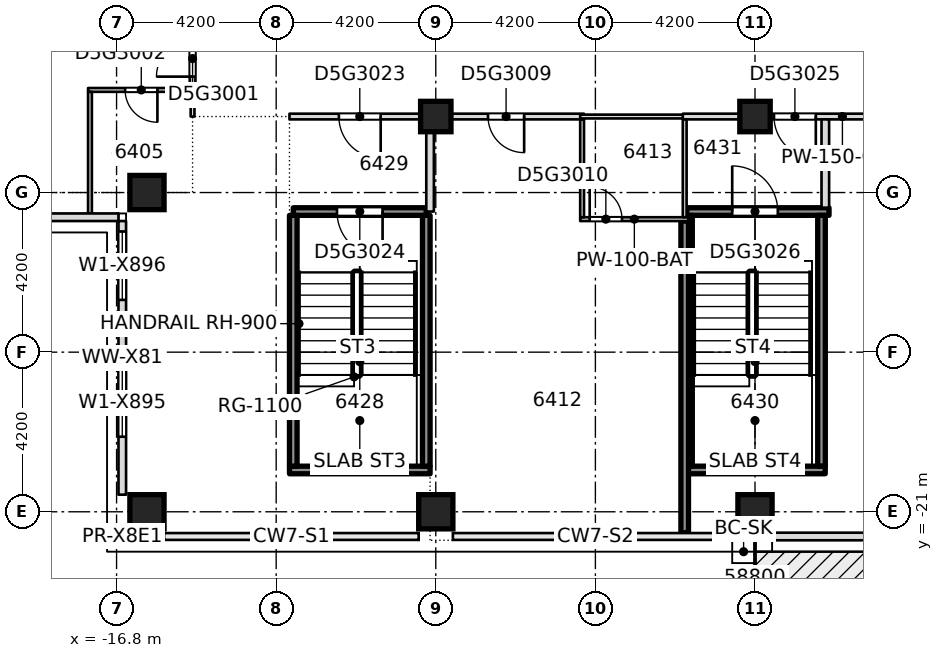
"""IFC4 building model, lengths in metres.
Left out: names, types, materials, properties, quantities, classifications, styles, units other than length and angle.
Written with IfcOpenShell. Run it as: python <this file> out.ifc"""

import sys

from ifc_helpers import new_model, si_unit, direction, frame, frame_2d, origin, origin_2d, place, context, subcontext, project, spatial, rectangle, extrude, element, fill, save


model = new_model("IFC4")
c1 = context("Model", 3, precision=1e-05, world=origin(), true_north=direction((0.0, 1.0)))
c2 = subcontext(c1, "Body", "Model", "MODEL_VIEW")
j1 = project(units=[si_unit("LENGTHUNIT", "METRE"), si_unit("PLANEANGLEUNIT", "RADIAN")], contexts=[c1])
p1 = place(None, origin())
s1 = spatial("IfcSite", under=j1, at=p1, CompositionType="ELEMENT")
p2 = place(p1, origin())
s2 = spatial("IfcBuilding", under=s1, at=p2, CompositionType="ELEMENT")
p3 = place(p2, frame((0.0, 0.0, 244.15)))
s3 = spatial("IfcBuildingStorey", under=s2, at=p3, CompositionType="ELEMENT", Elevation=244.15)
for number, where, z_axis, x_axis in (
    (1, (-16.0, -21.0, -0.4), (0.0, 0.0, 1.0), (1.0, 0.0, 0.0)),
    (2, (-8.4, -21.0, -0.4), (0.0, 0.0, 1.0), (1.0, 0.0, 0.0)),
    (3, (0.0, -21.0, -0.4), (0.0, 0.0, 1.0), (1.0, 0.0, 0.0)),
    (4, (-16.0, -12.6, -0.4), (0.0, 0.0, 1.0), (1.0, 0.0, 0.0)),
):
    element("IfcColumn", number, at=place(p3, frame(where, z_axis=z_axis, x_axis=x_axis)), inside=s3, PredefinedType="COLUMN", context=c2, shape_type="SweptSolid", body=[
        extrude(rectangle(XDim=0.9, YDim=0.9, at=origin_2d()), origin(), (0.0, 0.0, 1.0), 3.45),
    ])
for number, where, z_axis, x_axis in (
    (5, (-8.4, -10.6, -0.4), (0.0, 0.0, 1.0), (1.0, 0.0, 0.0)),
    (6, (0.0, -10.6, -0.4), (0.0, 0.0, 1.0), (1.0, 0.0, 0.0)),
):
    element("IfcColumn", number, at=place(p3, frame(where, z_axis=z_axis, x_axis=x_axis)), inside=s3, PredefinedType="COLUMN", context=c2, shape_type="SweptSolid", body=[
        extrude(rectangle(XDim=0.8, YDim=0.8, at=origin_2d()), origin(), (0.0, 0.0, 1.0), 3.45),
    ])
p4 = place(p3, frame((-1.848, -19.9, 0.0), z_axis=(0.0, 0.0, 1.0), x_axis=(1.0, 0.0, 0.0)))
e7 = element("IfcWall", 7, at=p4, inside=s3, PredefinedType="SOLIDWALL", context=c2, shape_type="SweptSolid", body=[
    extrude(rectangle(XDim=3.696, YDim=0.2, at=frame_2d((1.848, 0.0))), origin(), (0.0, 0.0, 1.0), 3.05),
])
p5 = place(p3, frame((-4.6, -13.3, 0.0), z_axis=(0.0, 0.0, 1.0), x_axis=(1.0, 0.0, 0.0)))
e8 = element("IfcWall", 8, at=p5, inside=s3, PredefinedType="PARTITIONING", context=c2, shape_type="SweptSolid", body=[
    extrude(rectangle(XDim=2.85, YDim=0.1, at=frame_2d((1.425, 0.0))), origin(), (0.0, 0.0, 1.0), 3.05),
])
p6 = place(p5, frame((0.25, 0.0, 0.0)))
e9 = element("IfcOpeningElement", 9, at=p6, cuts=e8, PredefinedType="OPENING", context=c2, shape_type="SweptSolid", body=[
    extrude(rectangle(XDim=0.85, YDim=2.1, at=frame_2d((0.425, 1.05))), frame((0.0, 0.06, 0.0), z_axis=(0.0, -1.0, 0.0), x_axis=(1.0, 0.0, 0.0)), (0.0, 0.0, 1.0), 0.12),
])
p7 = place(p3, frame((-12.15, -13.1, 0.0), z_axis=(0.0, 0.0, 1.0), x_axis=(1.0, 0.0, 0.0)))
e10 = element("IfcWall", 10, at=p7, inside=s3, PredefinedType="SOLIDWALL", context=c2, shape_type="SweptSolid", body=[
    extrude(rectangle(XDim=3.5, YDim=0.2, at=frame_2d((1.75, 0.0))), origin(), (0.0, 0.0, 1.0), 3.05),
])
p8 = place(p7, frame((1.15, 0.0, 0.0)))
e11 = element("IfcOpeningElement", 11, at=p8, cuts=e10, PredefinedType="OPENING", context=c2, shape_type="SweptSolid", body=[
    extrude(rectangle(XDim=1.2, YDim=2.1, at=frame_2d((0.6, 1.05))), frame((0.0, 0.11, 0.0), z_axis=(0.0, -1.0, 0.0), x_axis=(1.0, 0.0, 0.0)), (0.0, 0.0, 1.0), 0.22),
])
p9 = place(p3, frame((-1.798, -13.1, 0.0), z_axis=(0.0, 0.0, 1.0), x_axis=(1.0, 0.0, 0.0)))
e12 = element("IfcWall", 12, at=p9, inside=s3, PredefinedType="SOLIDWALL", context=c2, shape_type="SweptSolid", body=[
    extrude(rectangle(XDim=3.746, YDim=0.2, at=frame_2d((1.873, 0.0))), origin(), (0.0, 0.0, 1.0), 3.05),
])
p10 = place(p9, frame((1.198, 0.0, 0.0)))
e13 = element("IfcOpeningElement", 13, at=p10, cuts=e12, PredefinedType="OPENING", context=c2, shape_type="SweptSolid", body=[
    extrude(rectangle(XDim=1.2, YDim=2.1, at=frame_2d((0.6, 1.05))), frame((0.0, 0.11, 0.0), z_axis=(0.0, -1.0, 0.0), x_axis=(1.0, 0.0, 0.0)), (0.0, 0.0, 1.0), 0.22),
])
p11 = place(p3, frame((-12.25, -10.6, 0.0), z_axis=(0.0, 0.0, 1.0), x_axis=(1.0, 0.0, 0.0)))
e14 = element("IfcWall", 14, at=p11, inside=s3, PredefinedType="PARTITIONING", context=c2, shape_type="SweptSolid", body=[
    extrude(rectangle(XDim=7.75, YDim=0.15, at=frame_2d((3.875, 0.0))), origin(), (0.0, 0.0, 1.0), 3.05),
])
p12 = place(p11, frame((5.225, 0.0, 0.0)))
e15 = element("IfcOpeningElement", 15, at=p12, cuts=e14, PredefinedType="OPENING", context=c2, shape_type="SweptSolid", body=[
    extrude(rectangle(XDim=0.95, YDim=2.1, at=frame_2d((0.475, 1.05))), frame((0.0, 0.085, 0.0), z_axis=(0.0, -1.0, 0.0), x_axis=(1.0, 0.0, 0.0)), (0.0, 0.0, 1.0), 0.17),
])
p13 = place(p11, frame((1.3, 0.0, 0.0)))
e16 = element("IfcOpeningElement", 16, at=p13, cuts=e14, PredefinedType="OPENING", context=c2, shape_type="SweptSolid", body=[
    extrude(rectangle(XDim=1.1, YDim=2.1, at=frame_2d((0.55, 1.05))), frame((0.0, 0.085, 0.0), z_axis=(0.0, -1.0, 0.0), x_axis=(1.0, 0.0, 0.0)), (0.0, 0.0, 1.0), 0.17),
])
p14 = place(p3, frame((-4.6, -10.6, 0.0), z_axis=(0.0, 0.0, 1.0), x_axis=(1.0, 0.0, 0.0)))
e17 = element("IfcWall", 17, at=p14, inside=s3, PredefinedType="PARTITIONING", context=c2, shape_type="SweptSolid", body=[
    extrude(rectangle(XDim=2.8, YDim=0.1, at=frame_2d((1.4, 0.0))), origin(), (0.0, 0.0, 1.0), 3.05),
])
p15 = place(p3, frame((-1.9, -10.6, 0.0), z_axis=(0.0, 0.0, 1.0), x_axis=(1.0, 0.0, 0.0)))
e18 = element("IfcWall", 18, at=p15, inside=s3, PredefinedType="PARTITIONING", context=c2, shape_type="SweptSolid", body=[
    extrude(rectangle(XDim=8.4, YDim=0.15, at=frame_2d((4.2, 0.0))), origin(), (0.0, 0.0, 1.0), 3.05),
])
p16 = place(p15, frame((5.575, 0.0, 0.0)))
e19 = element("IfcOpeningElement", 19, at=p16, cuts=e18, PredefinedType="OPENING", context=c2, shape_type="SweptSolid", body=[
    extrude(rectangle(XDim=0.95, YDim=2.1, at=frame_2d((0.475, 1.05))), frame((0.0, 0.085, 0.0), z_axis=(0.0, -1.0, 0.0), x_axis=(1.0, 0.0, 0.0)), (0.0, 0.0, 1.0), 0.17),
])
p17 = place(p15, frame((2.4, 0.0, 0.0)))
e20 = element("IfcOpeningElement", 20, at=p17, cuts=e18, PredefinedType="OPENING", context=c2, shape_type="SweptSolid", body=[
    extrude(rectangle(XDim=1.1, YDim=2.1, at=frame_2d((0.55, 1.05))), frame((0.0, 0.085, 0.0), z_axis=(0.0, -1.0, 0.0), x_axis=(1.0, 0.0, 0.0)), (0.0, 0.0, 1.0), 0.17),
])
p18 = place(p3, frame((-17.55, -9.9, 0.0), z_axis=(0.0, 0.0, 1.0), x_axis=(1.0, 0.0, 0.0)))
e21 = element("IfcWall", 21, at=p18, inside=s3, PredefinedType="PARTITIONING", context=c2, shape_type="SweptSolid", body=[
    extrude(rectangle(XDim=2.825, YDim=0.1, at=frame_2d((1.413, 0.0))), origin(), (0.0, 0.0, 1.0), 3.05),
])
p19 = place(p18, frame((0.975, 0.0, 0.0)))
e22 = element("IfcOpeningElement", 22, at=p19, cuts=e21, PredefinedType="OPENING", context=c2, shape_type="SweptSolid", body=[
    extrude(rectangle(XDim=0.85, YDim=2.1, at=frame_2d((0.425, 1.05))), frame((0.0, 0.06, 0.0), z_axis=(0.0, -1.0, 0.0), x_axis=(1.0, 0.0, 0.0)), (0.0, 0.0, 1.0), 0.12),
])
p20 = place(p3, frame((-17.5, -13.15, 0.0), z_axis=(0.0, 0.0, 1.0), x_axis=(0.0, 1.0, 0.0)))
e23 = element("IfcWall", 23, at=p20, inside=s3, PredefinedType="PARTITIONING", context=c2, shape_type="SweptSolid", body=[
    extrude(rectangle(XDim=3.2, YDim=0.1, at=frame_2d((1.6, 0.0))), origin(), (0.0, 0.0, 1.0), 3.05),
])
p21 = place(p3, frame((-14.8, -10.6, 0.0), z_axis=(0.0, 0.0, 1.0), x_axis=(0.0, 1.0, 0.0)))
e24 = element("IfcWall", 24, at=p21, inside=s3, PredefinedType="PARTITIONING", context=c2, shape_type="SweptSolid", body=[
    extrude(rectangle(XDim=0.65, YDim=0.1, at=frame_2d((0.325, 0.0))), origin(), (0.0, 0.0, 1.0), 3.05),
])
p22 = place(p3, frame((-14.8, -9.85, 0.0), z_axis=(0.0, 0.0, 1.0), x_axis=(0.0, 1.0, 0.0)))
e25 = element("IfcWall", 25, at=p22, inside=s3, PredefinedType="PARTITIONING", context=c2, shape_type="SweptSolid", body=[
    extrude(rectangle(XDim=31.4, YDim=0.15, at=frame_2d((15.7, 0.0))), origin(), (0.0, 0.0, 1.0), 3.05),
])
p23 = place(p22, frame((0.3, 0.0, 0.0)))
e26 = element("IfcOpeningElement", 26, at=p23, cuts=e25, PredefinedType="OPENING", context=c2, shape_type="SweptSolid", body=[
    extrude(rectangle(XDim=0.95, YDim=2.1, at=frame_2d((0.475, 1.05))), frame((0.0, 0.085, 0.0), z_axis=(0.0, -1.0, 0.0), x_axis=(1.0, 0.0, 0.0)), (0.0, 0.0, 1.0), 0.17),
])
p24 = place(p22, frame((17.725, 0.0, 0.0)))
e27 = element("IfcOpeningElement", 27, at=p24, cuts=e25, PredefinedType="OPENING", context=c2, shape_type="SweptSolid", body=[
    extrude(rectangle(XDim=1.0, YDim=2.1, at=frame_2d((0.5, 1.05))), frame((0.0, 0.085, 0.0), z_axis=(0.0, -1.0, 0.0), x_axis=(1.0, 0.0, 0.0)), (0.0, 0.0, 1.0), 0.17),
])
p25 = place(p22, frame((24.8, 0.0, 0.0)))
e28 = element("IfcOpeningElement", 28, at=p25, cuts=e25, PredefinedType="OPENING", context=c2, shape_type="SweptSolid", body=[
    extrude(rectangle(XDim=0.95, YDim=2.1, at=frame_2d((0.475, 1.05))), frame((0.0, 0.085, 0.0), z_axis=(0.0, -1.0, 0.0), x_axis=(1.0, 0.0, 0.0)), (0.0, 0.0, 1.0), 0.17),
])
p26 = place(p22, frame((28.7, 0.0, 0.0)))
e29 = element("IfcOpeningElement", 29, at=p26, cuts=e25, PredefinedType="OPENING", context=c2, shape_type="SweptSolid", body=[
    extrude(rectangle(XDim=0.95, YDim=2.1, at=frame_2d((0.475, 1.05))), frame((0.0, 0.085, 0.0), z_axis=(0.0, -1.0, 0.0), x_axis=(1.0, 0.0, 0.0)), (0.0, 0.0, 1.0), 0.17),
])
p27 = place(p22, frame((9.3, 0.0, 0.0)))
e30 = element("IfcOpeningElement", 30, at=p27, cuts=e25, PredefinedType="OPENING", context=c2, shape_type="SweptSolid", body=[
    extrude(rectangle(XDim=1.1, YDim=2.1, at=frame_2d((0.55, 1.05))), frame((0.0, 0.085, 0.0), z_axis=(0.0, -1.0, 0.0), x_axis=(1.0, 0.0, 0.0)), (0.0, 0.0, 1.0), 0.17),
])
p28 = place(p22, frame((4.15, 0.0, 0.0)))
e31 = element("IfcOpeningElement", 31, at=p28, cuts=e25, PredefinedType="OPENING", context=c2, shape_type="SweptSolid", body=[
    extrude(rectangle(XDim=1.0, YDim=2.1, at=frame_2d((0.5, 1.05))), frame((0.0, 0.085, 0.0), z_axis=(0.0, -1.0, 0.0), x_axis=(1.0, 0.0, 0.0)), (0.0, 0.0, 1.0), 0.17),
])
p29 = place(p3, frame((-8.55, -13.1, 0.0), z_axis=(0.0, 0.0, 1.0), x_axis=(0.0, 1.0, 0.0)))
e32 = element("IfcWall", 32, at=p29, inside=s3, PredefinedType="PARTITIONING", context=c2, shape_type="SweptSolid", body=[
    extrude(rectangle(XDim=2.425, YDim=0.2, at=frame_2d((1.212, 0.0))), origin(), (0.0, 0.0, 1.0), 3.05),
])
for number, where, z_axis, x_axis in (
    (33, (-4.55, -13.25, 0.0), (0.0, 0.0, 1.0), (0.0, 1.0, 0.0)),
    (34, (-1.85, -13.25, 0.0), (0.0, 0.0, 1.0), (0.0, 1.0, 0.0)),
):
    element("IfcWall", number, at=place(p3, frame(where, z_axis=z_axis, x_axis=x_axis)), inside=s3, PredefinedType="PARTITIONING", context=c2, shape_type="SweptSolid", body=[
        extrude(rectangle(XDim=2.575, YDim=0.1, at=frame_2d((1.288, 0.0))), origin(), (0.0, 0.0, 1.0), 3.05),
    ])
for number, where, z_axis, x_axis in (
    (35, (-1.75, -19.798, 0.0), (0.0, 0.0, 1.0), (0.0, 1.0, 0.0)),
    (36, (1.75, -19.798, 0.0), (0.0, 0.0, 1.0), (0.0, 1.0, 0.0)),
):
    element("IfcWall", number, at=place(p3, frame(where, z_axis=z_axis, x_axis=x_axis)), inside=s3, PredefinedType="SOLIDWALL", context=c2, shape_type="SweptSolid", body=[
        extrude(rectangle(XDim=6.596, YDim=0.2, at=frame_2d((3.298, 0.0))), origin(), (0.0, 0.0, 1.0), 3.05),
    ])
p30 = place(p3, frame((1.85, -12.998, 0.0), z_axis=(0.0, 0.0, 1.0), x_axis=(0.0, 1.0, 0.0)))
e37 = element("IfcWall", 37, at=p30, inside=s3, PredefinedType="PARTITIONING", context=c2, shape_type="SweptSolid", body=[
    extrude(rectangle(XDim=2.323, YDim=0.2, at=frame_2d((1.162, 0.0))), origin(), (0.0, 0.0, 1.0), 3.05),
])
p31 = place(p3, frame((0.45, -21.65, 0.0), z_axis=(0.0, 0.0, 1.0), x_axis=(1.0, 0.0, 0.0)))
e38 = element("IfcWall", 38, at=p31, inside=s3, PredefinedType="STANDARD", context=c2, shape_type="SweptSolid", body=[
    extrude(rectangle(XDim=7.5, YDim=0.2, at=frame_2d((3.75, 0.0))), origin(), (0.0, 0.0, 1.0), 3.05),
])
p32 = place(p31, frame((4.175, 0.0, 0.2)))
e39 = element("IfcOpeningElement", 39, at=p32, cuts=e38, PredefinedType="OPENING", context=c2, shape_type="SweptSolid", body=[
    extrude(rectangle(XDim=1.8, YDim=2.65, at=frame_2d((0.9, 1.325))), frame((0.0, 0.11, 0.0), z_axis=(0.0, -1.0, 0.0), x_axis=(1.0, 0.0, 0.0)), (0.0, 0.0, 1.0), 0.22),
])
p33 = place(p31, frame((6.075, 0.0, 0.0)))
e40 = element("IfcOpeningElement", 40, at=p33, cuts=e38, PredefinedType="OPENING", context=c2, shape_type="SweptSolid", body=[
    extrude(rectangle(XDim=1.0, YDim=2.4, at=frame_2d((0.5, 1.2))), frame((0.0, 0.11, 0.0), z_axis=(0.0, -1.0, 0.0), x_axis=(1.0, 0.0, 0.0)), (0.0, 0.0, 1.0), 0.22),
])
p34 = place(p3, frame((-24.75, -13.25, 0.0), z_axis=(0.0, 0.0, 1.0), x_axis=(1.0, 0.0, 0.0)))
e41 = element("IfcWall", 41, at=p34, inside=s3, PredefinedType="STANDARD", context=c2, shape_type="SweptSolid", body=[
    extrude(rectangle(XDim=8.0, YDim=0.2, at=frame_2d((4.0, 0.0))), origin(), (0.0, 0.0, 1.0), 3.05),
])
p35 = place(p3, frame((-16.65, -13.35, 0.0), z_axis=(0.0, 0.0, 1.0), x_axis=(0.0, -1.0, 0.0)))
e42 = element("IfcWall", 42, at=p35, inside=s3, PredefinedType="STANDARD", context=c2, shape_type="SweptSolid", body=[
    extrude(rectangle(XDim=7.2, YDim=0.2, at=frame_2d((3.6, 0.0))), origin(), (0.0, 0.0, 1.0), 3.05),
])
p36 = place(p35, frame((3.875, 0.0, 0.2)))
e43 = element("IfcOpeningElement", 43, at=p36, cuts=e42, PredefinedType="OPENING", context=c2, shape_type="SweptSolid", body=[
    extrude(rectangle(XDim=1.8, YDim=2.65, at=frame_2d((0.9, 1.325))), frame((0.0, 0.11, 0.0), z_axis=(0.0, -1.0, 0.0), x_axis=(1.0, 0.0, 0.0)), (0.0, 0.0, 1.0), 0.22),
])
p37 = place(p35, frame((0.275, 0.0, 0.2)))
e44 = element("IfcOpeningElement", 44, at=p37, cuts=e42, PredefinedType="OPENING", context=c2, shape_type="SweptSolid", body=[
    extrude(rectangle(XDim=1.8, YDim=2.65, at=frame_2d((0.9, 1.325))), frame((0.0, 0.11, 0.0), z_axis=(0.0, -1.0, 0.0), x_axis=(1.0, 0.0, 0.0)), (0.0, 0.0, 1.0), 0.22),
])
p38 = place(p3, frame((-12.25, -19.9, 0.0), z_axis=(0.0, 0.0, 1.0), x_axis=(1.0, 0.0, 0.0)))
e45 = element("IfcWall", 45, at=p38, inside=s3, PredefinedType="SOLIDWALL", context=c2, shape_type="SweptSolid", body=[
    extrude(rectangle(XDim=3.7, YDim=0.2, at=frame_2d((1.85, 0.0))), origin(), (0.0, 0.0, 1.0), 3.05),
])
for number, where, z_axis, x_axis in (
    (46, (-12.15, -19.8, 0.0), (0.0, 0.0, 1.0), (0.0, 1.0, 0.0)),
    (47, (-8.65, -19.8, 0.0), (0.0, 0.0, 1.0), (0.0, 1.0, 0.0)),
):
    element("IfcWall", number, at=place(p3, frame(where, z_axis=z_axis, x_axis=x_axis)), inside=s3, PredefinedType="SOLIDWALL", context=c2, shape_type="SweptSolid", body=[
        extrude(rectangle(XDim=6.6, YDim=0.2, at=frame_2d((3.3, 0.0))), origin(), (0.0, 0.0, 1.0), 3.05),
    ])
p39 = place(p3, frame((-1.85, -21.55, 0.0), z_axis=(0.0, 0.0, 1.0), x_axis=(0.0, 1.0, 0.0)))
e48 = element("IfcWall", 48, at=p39, inside=s3, PredefinedType="SOLIDWALL", context=c2, shape_type="SweptSolid", body=[
    extrude(rectangle(XDim=8.2, YDim=0.2, at=frame_2d((4.1, 0.0))), origin(), (0.0, 0.0, 1.0), 3.05),
])
p40 = place(p23, origin())
e49 = element("IfcDoor", 49, at=p40, inside=s3, OperationType="SINGLE_SWING_LEFT", PredefinedType="DOOR", context=c2, shape_type="SweptSolid", body=[
    extrude(rectangle(XDim=0.95, YDim=2.1, at=frame_2d((0.475, 1.05))), frame((0.0, 0.025, 0.0), z_axis=(0.0, -1.0, 0.0), x_axis=(1.0, 0.0, 0.0)), (0.0, 0.0, 1.0), 0.05),
])
fill(e26, e49)
p41 = place(p19, origin())
e50 = element("IfcDoor", 50, at=p41, inside=s3, OperationType="SINGLE_SWING_RIGHT", PredefinedType="DOOR", context=c2, shape_type="SweptSolid", body=[
    extrude(rectangle(XDim=0.85, YDim=2.1, at=frame_2d((0.425, 1.05))), frame((0.0, 0.025, 0.0), z_axis=(0.0, -1.0, 0.0), x_axis=(1.0, 0.0, 0.0)), (0.0, 0.0, 1.0), 0.05),
])
fill(e22, e50)
p42 = place(p12, origin())
e51 = element("IfcDoor", 51, at=p42, inside=s3, OperationType="SINGLE_SWING_LEFT", PredefinedType="DOOR", context=c2, shape_type="SweptSolid", body=[
    extrude(rectangle(XDim=0.95, YDim=2.1, at=frame_2d((0.475, 1.05))), frame((0.0, 0.025, 0.0), z_axis=(0.0, -1.0, 0.0), x_axis=(1.0, 0.0, 0.0)), (0.0, 0.0, 1.0), 0.05),
])
fill(e15, e51)
p43 = place(p6, origin())
e52 = element("IfcDoor", 52, at=p43, inside=s3, OperationType="SINGLE_SWING_LEFT", PredefinedType="DOOR", context=c2, shape_type="SweptSolid", body=[
    extrude(rectangle(XDim=0.85, YDim=2.1, at=frame_2d((0.425, 1.05))), frame((0.0, 0.025, 0.0), z_axis=(0.0, -1.0, 0.0), x_axis=(1.0, 0.0, 0.0)), (0.0, 0.0, 1.0), 0.05),
])
fill(e9, e52)
p44 = place(p13, origin())
e53 = element("IfcDoor", 53, at=p44, inside=s3, OperationType="SINGLE_SWING_RIGHT", PredefinedType="DOOR", context=c2, shape_type="SweptSolid", body=[
    extrude(rectangle(XDim=1.1, YDim=2.1, at=frame_2d((0.55, 1.05))), frame((0.0, 0.025, 0.0), z_axis=(0.0, -1.0, 0.0), x_axis=(1.0, 0.0, 0.0)), (0.0, 0.0, 1.0), 0.05),
])
fill(e16, e53)
p45 = place(p8, origin())
e54 = element("IfcDoor", 54, at=p45, inside=s3, OperationType="SINGLE_SWING_RIGHT", PredefinedType="DOOR", context=c2, shape_type="SweptSolid", body=[
    extrude(rectangle(XDim=1.2, YDim=2.1, at=frame_2d((0.6, 1.05))), frame((0.0, 0.025, 0.0), z_axis=(0.0, -1.0, 0.0), x_axis=(1.0, 0.0, 0.0)), (0.0, 0.0, 1.0), 0.05),
])
fill(e11, e54)
p46 = place(p17, origin())
e55 = element("IfcDoor", 55, at=p46, inside=s3, OperationType="SINGLE_SWING_LEFT", PredefinedType="DOOR", context=c2, shape_type="SweptSolid", body=[
    extrude(rectangle(XDim=1.1, YDim=2.1, at=frame_2d((0.55, 1.05))), frame((0.0, 0.025, 0.0), z_axis=(0.0, -1.0, 0.0), x_axis=(1.0, 0.0, 0.0)), (0.0, 0.0, 1.0), 0.05),
])
fill(e20, e55)
p47 = place(p10, origin())
e56 = element("IfcDoor", 56, at=p47, inside=s3, OperationType="SINGLE_SWING_RIGHT", PredefinedType="DOOR", context=c2, shape_type="SweptSolid", body=[
    extrude(rectangle(XDim=1.2, YDim=2.1, at=frame_2d((0.6, 1.05))), frame((0.0, 0.025, 0.0), z_axis=(0.0, -1.0, 0.0), x_axis=(1.0, 0.0, 0.0)), (0.0, 0.0, 1.0), 0.05),
])
fill(e13, e56)
p48 = place(p36, origin())
e57 = element("IfcWindow", 57, at=p48, inside=s3, PartitioningType="SINGLE_PANEL", PredefinedType="WINDOW", context=c2, shape_type="SweptSolid", body=[
    extrude(rectangle(XDim=1.8, YDim=2.65, at=frame_2d((0.9, 1.325))), frame((0.0, 0.03, 0.0), z_axis=(0.0, -1.0, 0.0), x_axis=(1.0, 0.0, 0.0)), (0.0, 0.0, 1.0), 0.06),
])
fill(e43, e57)
p49 = place(p37, origin())
e58 = element("IfcWindow", 58, at=p49, inside=s3, PartitioningType="SINGLE_PANEL", PredefinedType="WINDOW", context=c2, shape_type="SweptSolid", body=[
    extrude(rectangle(XDim=1.8, YDim=2.65, at=frame_2d((0.9, 1.325))), frame((0.0, 0.03, 0.0), z_axis=(0.0, -1.0, 0.0), x_axis=(1.0, 0.0, 0.0)), (0.0, 0.0, 1.0), 0.06),
])
fill(e44, e58)
save(model, sys.argv[1])
